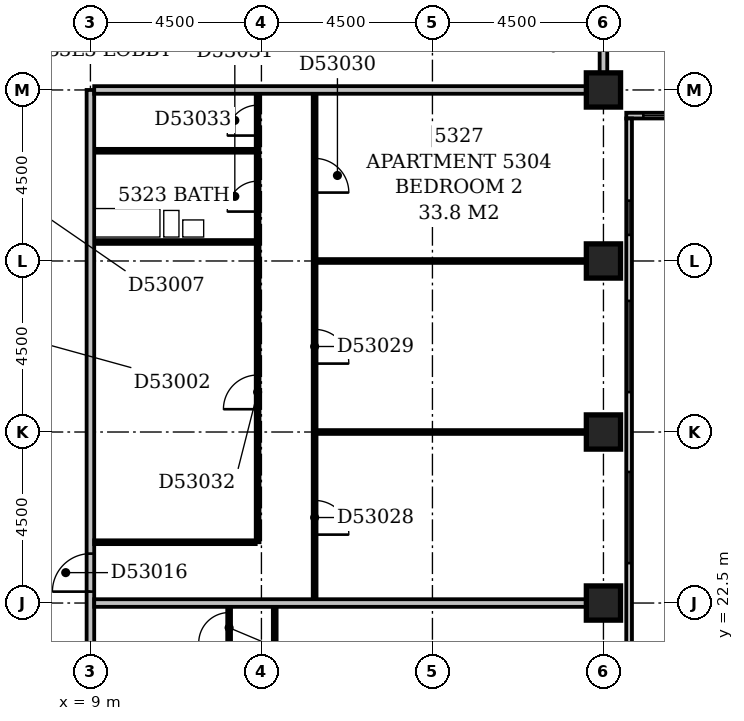
"""IFC4 building model, lengths in metres.
Left out: names, types, materials, properties, quantities, classifications, styles, units other than length and angle.
Written with IfcOpenShell. Run it as: python <this file> out.ifc"""

import sys

from ifc_helpers import new_model, si_unit, direction, frame, frame_2d, origin, origin_2d, place, context, subcontext, project, spatial, rectangle, extrude, element, fill, save


model = new_model("IFC4")
c1 = context("Model", 3, precision=1e-05, world=origin(), true_north=direction((0.0, 1.0)))
c2 = subcontext(c1, "Body", "Model", "MODEL_VIEW")
j1 = project(units=[si_unit("LENGTHUNIT", "METRE"), si_unit("PLANEANGLEUNIT", "RADIAN")], contexts=[c1])
p1 = place(None, origin())
s1 = spatial("IfcSite", under=j1, at=p1, CompositionType="ELEMENT")
p2 = place(p1, origin())
s2 = spatial("IfcBuilding", under=s1, at=p2, CompositionType="ELEMENT")
p3 = place(p2, frame((0.0, 0.0, 207.8)))
s3 = spatial("IfcBuildingStorey", under=s2, at=p3, CompositionType="ELEMENT", Elevation=207.8)
for number, where, z_axis, x_axis in (
    (1, (22.5, 22.5, -0.3), (0.0, 0.0, 1.0), (1.0, 0.0, 0.0)),
    (2, (22.5, 27.0, -0.3), (0.0, 0.0, 1.0), (1.0, 0.0, 0.0)),
    (3, (22.5, 31.5, -0.3), (0.0, 0.0, 1.0), (1.0, 0.0, 0.0)),
    (4, (22.5, 36.0, -0.3), (0.0, 0.0, 1.0), (1.0, 0.0, 0.0)),
):
    element("IfcColumn", number, at=place(p3, frame(where, z_axis=z_axis, x_axis=x_axis)), inside=s3, PredefinedType="COLUMN", context=c2, shape_type="SweptSolid", body=[
        extrude(rectangle(XDim=0.9, YDim=0.9, at=origin_2d()), origin(), (0.0, 0.0, 1.0), 3.55),
    ])
p4 = place(p3, frame((23.175, 17.4, 0.0), z_axis=(0.0, 0.0, 1.0), x_axis=(0.0, 1.0, 0.0)))
e5 = element("IfcWall", 5, at=p4, inside=s3, PredefinedType="STANDARD", context=c2, shape_type="SweptSolid", body=[
    extrude(rectangle(XDim=17.85, YDim=0.15, at=frame_2d((8.925, 0.0))), origin(), (0.0, 0.0, 1.0), 2.7),
])
p5 = place(p4, frame((1.65, 0.0, 0.6)))
e6 = element("IfcOpeningElement", 6, at=p5, cuts=e5, PredefinedType="OPENING", context=c2, shape_type="SweptSolid", body=[
    extrude(rectangle(XDim=2.4, YDim=1.8, at=frame_2d((1.2, 0.9))), frame((0.0, 0.087, 0.0), z_axis=(0.0, -1.0, 0.0), x_axis=(1.0, 0.0, 0.0)), (0.0, 0.0, 1.0), 0.174),
])
p6 = place(p4, frame((6.15, 0.0, 0.6)))
e7 = element("IfcOpeningElement", 7, at=p6, cuts=e5, PredefinedType="OPENING", context=c2, shape_type="SweptSolid", body=[
    extrude(rectangle(XDim=2.4, YDim=1.8, at=frame_2d((1.2, 0.9))), frame((0.0, 0.087, 0.0), z_axis=(0.0, -1.0, 0.0), x_axis=(1.0, 0.0, 0.0)), (0.0, 0.0, 1.0), 0.174),
])
p7 = place(p4, frame((10.65, 0.0, 0.6)))
e8 = element("IfcOpeningElement", 8, at=p7, cuts=e5, PredefinedType="OPENING", context=c2, shape_type="SweptSolid", body=[
    extrude(rectangle(XDim=2.4, YDim=1.8, at=frame_2d((1.2, 0.9))), frame((0.0, 0.087, 0.0), z_axis=(0.0, -1.0, 0.0), x_axis=(1.0, 0.0, 0.0)), (0.0, 0.0, 1.0), 0.174),
])
p8 = place(p4, frame((14.787, 0.0, 0.6)))
e9 = element("IfcOpeningElement", 9, at=p8, cuts=e5, PredefinedType="OPENING", context=c2, shape_type="SweptSolid", body=[
    extrude(rectangle(XDim=0.9, YDim=1.8, at=frame_2d((0.45, 0.9))), frame((0.0, 0.087, 0.0), z_axis=(0.0, -1.0, 0.0), x_axis=(1.0, 0.0, 0.0)), (0.0, 0.0, 1.0), 0.174),
])
p9 = place(p3, frame((23.1, 35.325, 0.0), z_axis=(0.0, 0.0, 1.0), x_axis=(1.0, 0.0, 0.0)))
e10 = element("IfcWall", 10, at=p9, inside=s3, PredefinedType="STANDARD", context=c2, shape_type="SweptSolid", body=[
    extrude(rectangle(XDim=27.15, YDim=0.15, at=frame_2d((13.575, 0.0))), origin(), (0.0, 0.0, 1.0), 2.7),
])
p10 = place(p9, frame((0.45, 0.0, 0.6)))
e11 = element("IfcOpeningElement", 11, at=p10, cuts=e10, PredefinedType="OPENING", context=c2, shape_type="SweptSolid", body=[
    extrude(rectangle(XDim=2.4, YDim=1.8, at=frame_2d((1.2, 0.9))), frame((0.0, 0.087, 0.0), z_axis=(0.0, -1.0, 0.0), x_axis=(1.0, 0.0, 0.0)), (0.0, 0.0, 1.0), 0.174),
])
p11 = place(p9, frame((4.95, 0.0, 0.6)))
e12 = element("IfcOpeningElement", 12, at=p11, cuts=e10, PredefinedType="OPENING", context=c2, shape_type="SweptSolid", body=[
    extrude(rectangle(XDim=2.4, YDim=1.8, at=frame_2d((1.2, 0.9))), frame((0.0, 0.087, 0.0), z_axis=(0.0, -1.0, 0.0), x_axis=(1.0, 0.0, 0.0)), (0.0, 0.0, 1.0), 0.174),
])
p12 = place(p9, frame((9.189, 0.0, 0.6)))
e13 = element("IfcOpeningElement", 13, at=p12, cuts=e10, PredefinedType="OPENING", context=c2, shape_type="SweptSolid", body=[
    extrude(rectangle(XDim=2.1, YDim=1.8, at=frame_2d((1.05, 0.9))), frame((0.0, 0.087, 0.0), z_axis=(0.0, -1.0, 0.0), x_axis=(1.0, 0.0, 0.0)), (0.0, 0.0, 1.0), 0.174),
])
p13 = place(p9, frame((14.558, 0.0, 0.6)))
e14 = element("IfcOpeningElement", 14, at=p13, cuts=e10, PredefinedType="OPENING", context=c2, shape_type="SweptSolid", body=[
    extrude(rectangle(XDim=2.1, YDim=1.8, at=frame_2d((1.05, 0.9))), frame((0.0, 0.087, 0.0), z_axis=(0.0, -1.0, 0.0), x_axis=(1.0, 0.0, 0.0)), (0.0, 0.0, 1.0), 0.174),
])
p14 = place(p9, frame((18.45, 0.0, 0.6)))
e15 = element("IfcOpeningElement", 15, at=p14, cuts=e10, PredefinedType="OPENING", context=c2, shape_type="SweptSolid", body=[
    extrude(rectangle(XDim=2.4, YDim=1.8, at=frame_2d((1.2, 0.9))), frame((0.0, 0.087, 0.0), z_axis=(0.0, -1.0, 0.0), x_axis=(1.0, 0.0, 0.0)), (0.0, 0.0, 1.0), 0.174),
])
p15 = place(p9, frame((22.95, 0.0, 0.6)))
e16 = element("IfcOpeningElement", 16, at=p15, cuts=e10, PredefinedType="OPENING", context=c2, shape_type="SweptSolid", body=[
    extrude(rectangle(XDim=2.4, YDim=1.8, at=frame_2d((1.2, 0.9))), frame((0.0, 0.087, 0.0), z_axis=(0.0, -1.0, 0.0), x_axis=(1.0, 0.0, 0.0)), (0.0, 0.0, 1.0), 0.174),
])
p16 = place(p3, frame((9.0, 5.0, 0.0), z_axis=(0.0, 0.0, 1.0), x_axis=(0.0, 1.0, 0.0)))
e17 = element("IfcWall", 17, at=p16, inside=s3, PredefinedType="PARTITIONING", context=c2, shape_type="SweptSolid", body=[
    extrude(rectangle(XDim=31.0, YDim=0.2, at=frame_2d((15.5, 0.0))), origin(), (0.0, 0.0, 1.0), 3.25),
])
p17 = place(p16, frame((17.8, 0.0, 0.0)))
e18 = element("IfcOpeningElement", 18, at=p17, cuts=e17, PredefinedType="OPENING", context=c2, shape_type="SweptSolid", body=[
    extrude(rectangle(XDim=1.0, YDim=2.1, at=frame_2d((0.5, 1.05))), frame((0.0, 0.112, 0.0), z_axis=(0.0, -1.0, 0.0), x_axis=(1.0, 0.0, 0.0)), (0.0, 0.0, 1.0), 0.224),
])
p18 = place(p16, frame((14.95, 0.0, 0.0)))
e19 = element("IfcOpeningElement", 19, at=p18, cuts=e17, PredefinedType="OPENING", context=c2, shape_type="SweptSolid", body=[
    extrude(rectangle(XDim=1.0, YDim=2.1, at=frame_2d((0.5, 1.05))), frame((0.0, 0.112, 0.0), z_axis=(0.0, -1.0, 0.0), x_axis=(1.0, 0.0, 0.0)), (0.0, 0.0, 1.0), 0.224),
])
p19 = place(p16, frame((9.3, 0.0, 0.0)))
e20 = element("IfcOpeningElement", 20, at=p19, cuts=e17, PredefinedType="OPENING", context=c2, shape_type="SweptSolid", body=[
    extrude(rectangle(XDim=1.0, YDim=2.1, at=frame_2d((0.5, 1.05))), frame((0.0, 0.112, 0.0), z_axis=(0.0, -1.0, 0.0), x_axis=(1.0, 0.0, 0.0)), (0.0, 0.0, 1.0), 0.224),
])
p20 = place(p16, frame((1.5, 0.0, 0.0)))
e21 = element("IfcOpeningElement", 21, at=p20, cuts=e17, PredefinedType="OPENING", context=c2, shape_type="SweptSolid", body=[
    extrude(rectangle(XDim=0.9, YDim=2.1, at=frame_2d((0.45, 1.05))), frame((0.0, 0.112, 0.0), z_axis=(0.0, -1.0, 0.0), x_axis=(1.0, 0.0, 0.0)), (0.0, 0.0, 1.0), 0.224),
])
p21 = place(p3, frame((13.85, 18.1, 0.0), z_axis=(0.0, 0.0, 1.0), x_axis=(0.0, 1.0, 0.0)))
e22 = element("IfcWall", 22, at=p21, inside=s3, PredefinedType="PARTITIONING", context=c2, shape_type="SweptSolid", body=[
    extrude(rectangle(XDim=4.3, YDim=0.1, at=frame_2d((2.15, 0.0))), origin(), (0.0, 0.0, 1.0), 3.25),
])
p22 = place(p21, frame((1.7, 0.0, 0.0)))
e23 = element("IfcOpeningElement", 23, at=p22, cuts=e22, PredefinedType="OPENING", context=c2, shape_type="SweptSolid", body=[
    extrude(rectangle(XDim=0.9, YDim=2.1, at=frame_2d((0.45, 1.05))), frame((0.0, 0.062, 0.0), z_axis=(0.0, -1.0, 0.0), x_axis=(1.0, 0.0, 0.0)), (0.0, 0.0, 1.0), 0.124),
])
p23 = place(p3, frame((12.65, 21.2, 0.0), z_axis=(0.0, 0.0, 1.0), x_axis=(0.0, 1.0, 0.0)))
e24 = element("IfcWall", 24, at=p23, inside=s3, PredefinedType="PARTITIONING", context=c2, shape_type="SweptSolid", body=[
    extrude(rectangle(XDim=1.2, YDim=0.1, at=frame_2d((0.6, 0.0))), origin(), (0.0, 0.0, 1.0), 3.25),
])
p24 = place(p23, frame((0.25, 0.0, 0.0)))
e25 = element("IfcOpeningElement", 25, at=p24, cuts=e24, PredefinedType="OPENING", context=c2, shape_type="SweptSolid", body=[
    extrude(rectangle(XDim=0.8, YDim=2.1, at=frame_2d((0.4, 1.05))), frame((0.0, 0.062, 0.0), z_axis=(0.0, -1.0, 0.0), x_axis=(1.0, 0.0, 0.0)), (0.0, 0.0, 1.0), 0.124),
])
p25 = place(p3, frame((9.1, 22.5, 0.0), z_axis=(0.0, 0.0, 1.0), x_axis=(1.0, 0.0, 0.0)))
e26 = element("IfcWall", 26, at=p25, inside=s3, PredefinedType="PARTITIONING", context=c2, shape_type="SweptSolid", body=[
    extrude(rectangle(XDim=12.95, YDim=0.2, at=frame_2d((6.475, 0.0))), origin(), (0.0, 0.0, 1.0), 3.25),
])
p26 = place(p3, frame((14.9, 22.6, 0.0), z_axis=(0.0, 0.0, 1.0), x_axis=(0.0, 1.0, 0.0)))
e27 = element("IfcWall", 27, at=p26, inside=s3, PredefinedType="PARTITIONING", context=c2, shape_type="SweptSolid", body=[
    extrude(rectangle(XDim=13.3, YDim=0.1, at=frame_2d((6.65, 0.0))), origin(), (0.0, 0.0, 1.0), 3.25),
])
p27 = place(p26, frame((1.7, 0.0, 0.0)))
e28 = element("IfcOpeningElement", 28, at=p27, cuts=e27, PredefinedType="OPENING", context=c2, shape_type="SweptSolid", body=[
    extrude(rectangle(XDim=0.9, YDim=2.1, at=frame_2d((0.45, 1.05))), frame((0.0, 0.062, 0.0), z_axis=(0.0, -1.0, 0.0), x_axis=(1.0, 0.0, 0.0)), (0.0, 0.0, 1.0), 0.124),
])
p28 = place(p26, frame((6.2, 0.0, 0.0)))
e29 = element("IfcOpeningElement", 29, at=p28, cuts=e27, PredefinedType="OPENING", context=c2, shape_type="SweptSolid", body=[
    extrude(rectangle(XDim=0.9, YDim=2.1, at=frame_2d((0.45, 1.05))), frame((0.0, 0.062, 0.0), z_axis=(0.0, -1.0, 0.0), x_axis=(1.0, 0.0, 0.0)), (0.0, 0.0, 1.0), 0.124),
])
p29 = place(p26, frame((10.7, 0.0, 0.0)))
e30 = element("IfcOpeningElement", 30, at=p29, cuts=e27, PredefinedType="OPENING", context=c2, shape_type="SweptSolid", body=[
    extrude(rectangle(XDim=0.9, YDim=2.1, at=frame_2d((0.45, 1.05))), frame((0.0, 0.062, 0.0), z_axis=(0.0, -1.0, 0.0), x_axis=(1.0, 0.0, 0.0)), (0.0, 0.0, 1.0), 0.124),
])
p30 = place(p3, frame((9.1, 24.1, 0.0), z_axis=(0.0, 0.0, 1.0), x_axis=(1.0, 0.0, 0.0)))
e31 = element("IfcWall", 31, at=p30, inside=s3, PredefinedType="PARTITIONING", context=c2, shape_type="SweptSolid", body=[
    extrude(rectangle(XDim=4.25, YDim=0.1, at=frame_2d((2.125, 0.0))), origin(), (0.0, 0.0, 1.0), 3.25),
])
p31 = place(p3, frame((13.4, 24.1, 0.0), z_axis=(0.0, 0.0, 1.0), x_axis=(0.0, 1.0, 0.0)))
e32 = element("IfcWall", 32, at=p31, inside=s3, PredefinedType="PARTITIONING", context=c2, shape_type="SweptSolid", body=[
    extrude(rectangle(XDim=11.8, YDim=0.1, at=frame_2d((5.9, 0.0))), origin(), (0.0, 0.0, 1.0), 3.25),
])
p32 = place(p31, frame((8.7, 0.0, 0.0)))
e33 = element("IfcOpeningElement", 33, at=p32, cuts=e32, PredefinedType="OPENING", context=c2, shape_type="SweptSolid", body=[
    extrude(rectangle(XDim=0.8, YDim=2.1, at=frame_2d((0.4, 1.05))), frame((0.0, 0.062, 0.0), z_axis=(0.0, -1.0, 0.0), x_axis=(1.0, 0.0, 0.0)), (0.0, 0.0, 1.0), 0.124),
])
p33 = place(p31, frame((3.5, 0.0, 0.0)))
e34 = element("IfcOpeningElement", 34, at=p33, cuts=e32, PredefinedType="OPENING", context=c2, shape_type="SweptSolid", body=[
    extrude(rectangle(XDim=0.9, YDim=2.1, at=frame_2d((0.45, 1.05))), frame((0.0, 0.062, 0.0), z_axis=(0.0, -1.0, 0.0), x_axis=(1.0, 0.0, 0.0)), (0.0, 0.0, 1.0), 0.124),
])
p34 = place(p31, frame((10.7, 0.0, 0.0)))
e35 = element("IfcOpeningElement", 35, at=p34, cuts=e32, PredefinedType="OPENING", context=c2, shape_type="SweptSolid", body=[
    extrude(rectangle(XDim=0.8, YDim=2.1, at=frame_2d((0.4, 1.05))), frame((0.0, 0.062, 0.0), z_axis=(0.0, -1.0, 0.0), x_axis=(1.0, 0.0, 0.0)), (0.0, 0.0, 1.0), 0.124),
])
p35 = place(p3, frame((14.95, 27.0, 0.0), z_axis=(0.0, 0.0, 1.0), x_axis=(1.0, 0.0, 0.0)))
e36 = element("IfcWall", 36, at=p35, inside=s3, PredefinedType="PARTITIONING", context=c2, shape_type="SweptSolid", body=[
    extrude(rectangle(XDim=7.1, YDim=0.1, at=frame_2d((3.55, 0.0))), origin(), (0.0, 0.0, 1.0), 2.65),
])
p36 = place(p3, frame((14.95, 31.5, 0.0), z_axis=(0.0, 0.0, 1.0), x_axis=(1.0, 0.0, 0.0)))
e37 = element("IfcWall", 37, at=p36, inside=s3, PredefinedType="PARTITIONING", context=c2, shape_type="SweptSolid", body=[
    extrude(rectangle(XDim=7.1, YDim=0.1, at=frame_2d((3.55, 0.0))), origin(), (0.0, 0.0, 1.0), 3.25),
])
for number, where, z_axis, x_axis in (
    (38, (9.1, 32.0, 0.0), (0.0, 0.0, 1.0), (1.0, 0.0, 0.0)),
    (39, (9.1, 34.4, 0.0), (0.0, 0.0, 1.0), (1.0, 0.0, 0.0)),
):
    element("IfcWall", number, at=place(p3, frame(where, z_axis=z_axis, x_axis=x_axis)), inside=s3, PredefinedType="PLUMBINGWALL", context=c2, shape_type="SweptSolid", body=[
        extrude(rectangle(XDim=4.25, YDim=0.1, at=frame_2d((2.125, 0.0))), origin(), (0.0, 0.0, 1.0), 3.25),
    ])
p37 = place(p3, frame((9.1, 36.0, 0.0), z_axis=(0.0, 0.0, 1.0), x_axis=(1.0, 0.0, 0.0)))
e40 = element("IfcWall", 40, at=p37, inside=s3, PredefinedType="PARTITIONING", context=c2, shape_type="SweptSolid", body=[
    extrude(rectangle(XDim=12.95, YDim=0.2, at=frame_2d((6.475, 0.0))), origin(), (0.0, 0.0, 1.0), 3.25),
])
p38 = place(p3, frame((22.5, 36.45, 0.0), z_axis=(0.0, 0.0, 1.0), x_axis=(0.0, 1.0, 0.0)))
e41 = element("IfcWall", 41, at=p38, inside=s3, PredefinedType="PARTITIONING", context=c2, shape_type="SweptSolid", body=[
    extrude(rectangle(XDim=13.05, YDim=0.2, at=frame_2d((6.525, 0.0))), origin(), (0.0, 0.0, 1.0), 3.25),
])
p39 = place(p6, origin())
e42 = element("IfcWindow", 42, at=p39, inside=s3, PartitioningType="SINGLE_PANEL", PredefinedType="WINDOW", context=c2, shape_type="SweptSolid", body=[
    extrude(rectangle(XDim=2.4, YDim=1.8, at=frame_2d((1.2, 0.9))), frame((0.0, 0.03, 0.0), z_axis=(0.0, -1.0, 0.0), x_axis=(1.0, 0.0, 0.0)), (0.0, 0.0, 1.0), 0.06),
])
fill(e7, e42)
p40 = place(p7, origin())
e43 = element("IfcWindow", 43, at=p40, inside=s3, PartitioningType="SINGLE_PANEL", PredefinedType="WINDOW", context=c2, shape_type="SweptSolid", body=[
    extrude(rectangle(XDim=2.4, YDim=1.8, at=frame_2d((1.2, 0.9))), frame((0.0, 0.03, 0.0), z_axis=(0.0, -1.0, 0.0), x_axis=(1.0, 0.0, 0.0)), (0.0, 0.0, 1.0), 0.06),
])
fill(e8, e43)
p41 = place(p8, origin())
e44 = element("IfcWindow", 44, at=p41, inside=s3, PartitioningType="SINGLE_PANEL", PredefinedType="WINDOW", context=c2, shape_type="SweptSolid", body=[
    extrude(rectangle(XDim=0.9, YDim=1.8, at=frame_2d((0.45, 0.9))), frame((0.0, 0.03, 0.0), z_axis=(0.0, -1.0, 0.0), x_axis=(1.0, 0.0, 0.0)), (0.0, 0.0, 1.0), 0.06),
])
fill(e9, e44)
p42 = place(p10, origin())
e45 = element("IfcWindow", 45, at=p42, inside=s3, PartitioningType="SINGLE_PANEL", PredefinedType="WINDOW", context=c2, shape_type="SweptSolid", body=[
    extrude(rectangle(XDim=2.4, YDim=1.8, at=frame_2d((1.2, 0.9))), frame((0.0, 0.03, 0.0), z_axis=(0.0, -1.0, 0.0), x_axis=(1.0, 0.0, 0.0)), (0.0, 0.0, 1.0), 0.06),
])
fill(e11, e45)
p43 = place(p17, origin())
e46 = element("IfcDoor", 46, at=p43, inside=s3, OperationType="SINGLE_SWING_LEFT", PredefinedType="DOOR", context=c2, shape_type="SweptSolid", body=[
    extrude(rectangle(XDim=1.0, YDim=2.1, at=frame_2d((0.5, 1.05))), frame((0.0, 0.025, 0.0), z_axis=(0.0, -1.0, 0.0), x_axis=(1.0, 0.0, 0.0)), (0.0, 0.0, 1.0), 0.05),
])
fill(e18, e46)
p44 = place(p24, origin())
e47 = element("IfcDoor", 47, at=p44, inside=s3, OperationType="SINGLE_SWING_LEFT", PredefinedType="DOOR", context=c2, shape_type="SweptSolid", body=[
    extrude(rectangle(XDim=0.8, YDim=2.1, at=frame_2d((0.4, 1.05))), frame((0.0, 0.025, 0.0), z_axis=(0.0, -1.0, 0.0), x_axis=(1.0, 0.0, 0.0)), (0.0, 0.0, 1.0), 0.05),
])
fill(e25, e47)
p45 = place(p27, frame((0.9, 0.0, 0.0), z_axis=(0.0, 0.0, 1.0), x_axis=(-1.0, 0.0, 0.0)))
e48 = element("IfcDoor", 48, at=p45, inside=s3, OperationType="SINGLE_SWING_RIGHT", PredefinedType="DOOR", context=c2, shape_type="SweptSolid", body=[
    extrude(rectangle(XDim=0.9, YDim=2.1, at=frame_2d((0.45, 1.05))), frame((0.0, 0.025, 0.0), z_axis=(0.0, -1.0, 0.0), x_axis=(1.0, 0.0, 0.0)), (0.0, 0.0, 1.0), 0.05),
])
fill(e28, e48)
p46 = place(p28, frame((0.9, 0.0, 0.0), z_axis=(0.0, 0.0, 1.0), x_axis=(-1.0, 0.0, 0.0)))
e49 = element("IfcDoor", 49, at=p46, inside=s3, OperationType="SINGLE_SWING_RIGHT", PredefinedType="DOOR", context=c2, shape_type="SweptSolid", body=[
    extrude(rectangle(XDim=0.9, YDim=2.1, at=frame_2d((0.45, 1.05))), frame((0.0, 0.025, 0.0), z_axis=(0.0, -1.0, 0.0), x_axis=(1.0, 0.0, 0.0)), (0.0, 0.0, 1.0), 0.05),
])
fill(e29, e49)
p47 = place(p29, frame((0.9, 0.0, 0.0), z_axis=(0.0, 0.0, 1.0), x_axis=(-1.0, 0.0, 0.0)))
e50 = element("IfcDoor", 50, at=p47, inside=s3, OperationType="SINGLE_SWING_RIGHT", PredefinedType="DOOR", context=c2, shape_type="SweptSolid", body=[
    extrude(rectangle(XDim=0.9, YDim=2.1, at=frame_2d((0.45, 1.05))), frame((0.0, 0.025, 0.0), z_axis=(0.0, -1.0, 0.0), x_axis=(1.0, 0.0, 0.0)), (0.0, 0.0, 1.0), 0.05),
])
fill(e30, e50)
p48 = place(p32, origin())
e51 = element("IfcDoor", 51, at=p48, inside=s3, OperationType="SINGLE_SWING_LEFT", PredefinedType="DOOR", context=c2, shape_type="SweptSolid", body=[
    extrude(rectangle(XDim=0.8, YDim=2.1, at=frame_2d((0.4, 1.05))), frame((0.0, 0.025, 0.0), z_axis=(0.0, -1.0, 0.0), x_axis=(1.0, 0.0, 0.0)), (0.0, 0.0, 1.0), 0.05),
])
fill(e33, e51)
p49 = place(p33, origin())
e52 = element("IfcDoor", 52, at=p49, inside=s3, OperationType="SINGLE_SWING_LEFT", PredefinedType="DOOR", context=c2, shape_type="SweptSolid", body=[
    extrude(rectangle(XDim=0.9, YDim=2.1, at=frame_2d((0.45, 1.05))), frame((0.0, 0.025, 0.0), z_axis=(0.0, -1.0, 0.0), x_axis=(1.0, 0.0, 0.0)), (0.0, 0.0, 1.0), 0.05),
])
fill(e34, e52)
p50 = place(p34, origin())
e53 = element("IfcDoor", 53, at=p50, inside=s3, OperationType="SINGLE_SWING_LEFT", PredefinedType="DOOR", context=c2, shape_type="SweptSolid", body=[
    extrude(rectangle(XDim=0.8, YDim=2.1, at=frame_2d((0.4, 1.05))), frame((0.0, 0.025, 0.0), z_axis=(0.0, -1.0, 0.0), x_axis=(1.0, 0.0, 0.0)), (0.0, 0.0, 1.0), 0.05),
])
fill(e35, e53)
save(model, sys.argv[1])
